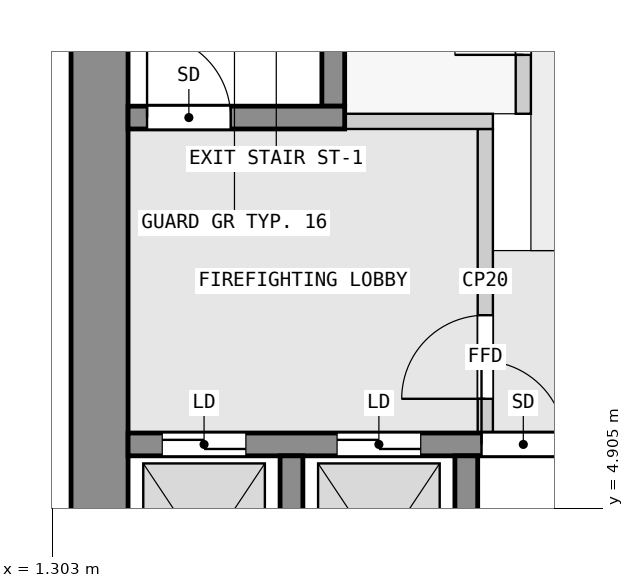
"""IFC4 building model, lengths in metres.
Left out: names, types, materials, properties, quantities, classifications, styles, units other than length and angle.
Written with IfcOpenShell. Run it as: python <this file> out.ifc"""

import sys

from ifc_helpers import new_model, si_unit, direction, frame, frame_2d, origin, place, context, subcontext, project, spatial, rectangle, extrude, element, fill, save


model = new_model("IFC4")
c1 = context("Model", 3, precision=1e-05, world=origin(), true_north=direction((0.0, 1.0)))
c2 = subcontext(c1, "Body", "Model", "MODEL_VIEW")
j1 = project(units=[si_unit("LENGTHUNIT", "METRE"), si_unit("PLANEANGLEUNIT", "RADIAN")], contexts=[c1])
p1 = place(None, origin())
s1 = spatial("IfcSite", under=j1, at=p1, CompositionType="ELEMENT")
p2 = place(p1, origin())
s2 = spatial("IfcBuilding", under=s1, at=p2, CompositionType="ELEMENT")
p3 = place(p2, frame((0.0, 0.0, 37.3)))
s3 = spatial("IfcBuildingStorey", under=s2, at=p3, CompositionType="ELEMENT", Elevation=37.3)
p4 = place(p3, frame((1.925, 2.5, 0.0), z_axis=(0.0, 0.0, 1.0), x_axis=(0.0, 1.0, 0.0)))
e1 = element("IfcWall", 1, at=p4, inside=s3, PredefinedType="SHEAR", context=c2, shape_type="SweptSolid", body=[
    extrude(rectangle(XDim=14.75, YDim=0.75, at=frame_2d((7.375, 0.0))), origin(), (0.0, 0.0, 1.0), 3.25),
])
for number, where, z_axis, x_axis in (
    (2, (4.45, 2.8, 0.0), (0.0, 0.0, 1.0), (0.0, 1.0, 0.0)),
    (3, (6.75, 2.8, 0.0), (0.0, 0.0, 1.0), (0.0, 1.0, 0.0)),
):
    element("IfcWall", number, at=place(p3, frame(where, z_axis=z_axis, x_axis=x_axis)), inside=s3, PredefinedType="SHEAR", context=c2, shape_type="SweptSolid", body=[
        extrude(rectangle(XDim=2.8, YDim=0.3, at=frame_2d((1.4, 0.0))), origin(), (0.0, 0.0, 1.0), 3.25),
    ])
p5 = place(p3, frame((2.3, 5.75, 0.0), z_axis=(0.0, 0.0, 1.0), x_axis=(1.0, 0.0, 0.0)))
e4 = element("IfcWall", 4, at=p5, inside=s3, PredefinedType="SHEAR", context=c2, shape_type="SweptSolid", body=[
    extrude(rectangle(XDim=18.8, YDim=0.3, at=frame_2d((9.4, 0.0))), origin(), (0.0, 0.0, 1.0), 3.25),
])
p6 = place(p5, frame((4.65, 0.0, 0.0)))
e5 = element("IfcOpeningElement", 5, at=p6, cuts=e4, PredefinedType="OPENING", context=c2, shape_type="SweptSolid", body=[
    extrude(rectangle(XDim=1.1, YDim=2.1, at=frame_2d((0.55, 1.05))), frame((0.0, 0.16, 0.0), z_axis=(0.0, -1.0, 0.0), x_axis=(1.0, 0.0, 0.0)), (0.0, 0.0, 1.0), 0.32),
])
p7 = place(p5, frame((0.45, 0.0, 0.0)))
e6 = element("IfcOpeningElement", 6, at=p7, cuts=e4, PredefinedType="OPENING", context=c2, shape_type="SweptSolid", body=[
    extrude(rectangle(XDim=1.1, YDim=2.1, at=frame_2d((0.55, 1.05))), frame((0.0, 0.16, 0.0), z_axis=(0.0, -1.0, 0.0), x_axis=(1.0, 0.0, 0.0)), (0.0, 0.0, 1.0), 0.32),
])
p8 = place(p5, frame((2.75, 0.0, 0.0)))
e7 = element("IfcOpeningElement", 7, at=p8, cuts=e4, PredefinedType="OPENING", context=c2, shape_type="SweptSolid", body=[
    extrude(rectangle(XDim=1.1, YDim=2.1, at=frame_2d((0.55, 1.05))), frame((0.0, 0.16, 0.0), z_axis=(0.0, -1.0, 0.0), x_axis=(1.0, 0.0, 0.0)), (0.0, 0.0, 1.0), 0.32),
])
p9 = place(p5, frame((11.85, 0.0, 0.0)))
e8 = element("IfcOpeningElement", 8, at=p9, cuts=e4, PredefinedType="OPENING", context=c2, shape_type="SweptSolid", body=[
    extrude(rectangle(XDim=1.1, YDim=2.1, at=frame_2d((0.55, 1.05))), frame((0.0, 0.16, 0.0), z_axis=(0.0, -1.0, 0.0), x_axis=(1.0, 0.0, 0.0)), (0.0, 0.0, 1.0), 0.32),
])
p10 = place(p5, frame((14.35, 0.0, 0.0)))
e9 = element("IfcOpeningElement", 9, at=p10, cuts=e4, PredefinedType="OPENING", context=c2, shape_type="SweptSolid", body=[
    extrude(rectangle(XDim=1.1, YDim=2.1, at=frame_2d((0.55, 1.05))), frame((0.0, 0.16, 0.0), z_axis=(0.0, -1.0, 0.0), x_axis=(1.0, 0.0, 0.0)), (0.0, 0.0, 1.0), 0.32),
])
p11 = place(p5, frame((16.85, 0.0, 0.0)))
e10 = element("IfcOpeningElement", 10, at=p11, cuts=e4, PredefinedType="OPENING", context=c2, shape_type="SweptSolid", body=[
    extrude(rectangle(XDim=1.1, YDim=2.1, at=frame_2d((0.55, 1.05))), frame((0.0, 0.16, 0.0), z_axis=(0.0, -1.0, 0.0), x_axis=(1.0, 0.0, 0.0)), (0.0, 0.0, 1.0), 0.32),
])
p12 = place(p3, frame((2.3, 10.05, 0.0), z_axis=(0.0, 0.0, 1.0), x_axis=(1.0, 0.0, 0.0)))
e11 = element("IfcWall", 11, at=p12, inside=s3, PredefinedType="SHEAR", context=c2, shape_type="SweptSolid", body=[
    extrude(rectangle(XDim=2.85, YDim=0.3, at=frame_2d((1.425, 0.0))), origin(), (0.0, 0.0, 1.0), 3.25),
])
p13 = place(p12, frame((0.25, 0.0, 0.0)))
e12 = element("IfcOpeningElement", 12, at=p13, cuts=e11, PredefinedType="OPENING", context=c2, shape_type="SweptSolid", body=[
    extrude(rectangle(XDim=1.1, YDim=2.1, at=frame_2d((0.55, 1.05))), frame((0.0, 0.16, 0.0), z_axis=(0.0, -1.0, 0.0), x_axis=(1.0, 0.0, 0.0)), (0.0, 0.0, 1.0), 0.32),
])
p14 = place(p3, frame((5.0, 10.2, 0.0), z_axis=(0.0, 0.0, 1.0), x_axis=(0.0, 1.0, 0.0)))
e13 = element("IfcWall", 13, at=p14, inside=s3, PredefinedType="SHEAR", context=c2, shape_type="SweptSolid", body=[
    extrude(rectangle(XDim=6.4, YDim=0.3, at=frame_2d((3.2, 0.0))), origin(), (0.0, 0.0, 1.0), 3.25),
])
p15 = place(p3, frame((7.0, 5.9, 0.0), z_axis=(0.0, 0.0, 1.0), x_axis=(0.0, 1.0, 0.0)))
e14 = element("IfcWall", 14, at=p15, inside=s3, PredefinedType="PARTITIONING", context=c2, shape_type="SweptSolid", body=[
    extrude(rectangle(XDim=4.0, YDim=0.2, at=frame_2d((2.0, 0.0))), origin(), (0.0, 0.0, 1.0), 3.25),
])
p16 = place(p15, frame((0.45, 0.0, 0.0)))
e15 = element("IfcOpeningElement", 15, at=p16, cuts=e14, PredefinedType="OPENING", context=c2, shape_type="SweptSolid", body=[
    extrude(rectangle(XDim=1.1, YDim=2.1, at=frame_2d((0.55, 1.05))), frame((0.0, 0.11, 0.0), z_axis=(0.0, -1.0, 0.0), x_axis=(1.0, 0.0, 0.0)), (0.0, 0.0, 1.0), 0.22),
])
p17 = place(p3, frame((5.15, 10.0, 0.0), z_axis=(0.0, 0.0, 1.0), x_axis=(1.0, 0.0, 0.0)))
e16 = element("IfcWall", 16, at=p17, inside=s3, PredefinedType="PARTITIONING", context=c2, shape_type="SweptSolid", body=[
    extrude(rectangle(XDim=1.95, YDim=0.2, at=frame_2d((0.975, 0.0))), origin(), (0.0, 0.0, 1.0), 3.25),
])
p18 = place(p3, frame((7.5, 10.1, 0.0), z_axis=(0.0, 0.0, 1.0), x_axis=(0.0, 1.0, 0.0)))
e17 = element("IfcWall", 17, at=p18, inside=s3, PredefinedType="PARTITIONING", context=c2, shape_type="SweptSolid", body=[
    extrude(rectangle(XDim=7.15, YDim=0.2, at=frame_2d((3.575, 0.0))), origin(), (0.0, 0.0, 1.0), 3.25),
])
p19 = place(p18, frame((0.775, 0.0, 0.0)))
e18 = element("IfcOpeningElement", 18, at=p19, cuts=e17, PredefinedType="OPENING", context=c2, shape_type="SweptSolid", body=[
    extrude(rectangle(XDim=0.9, YDim=2.1, at=frame_2d((0.45, 1.05))), frame((0.0, 0.11, 0.0), z_axis=(0.0, -1.0, 0.0), x_axis=(1.0, 0.0, 0.0)), (0.0, 0.0, 1.0), 0.22),
])
p20 = place(p18, frame((3.225, 0.0, 0.0)))
e19 = element("IfcOpeningElement", 19, at=p20, cuts=e17, PredefinedType="OPENING", context=c2, shape_type="SweptSolid", body=[
    extrude(rectangle(XDim=0.9, YDim=2.1, at=frame_2d((0.45, 1.05))), frame((0.0, 0.11, 0.0), z_axis=(0.0, -1.0, 0.0), x_axis=(1.0, 0.0, 0.0)), (0.0, 0.0, 1.0), 0.22),
])
p21 = place(p18, frame((5.25, 0.0, 0.0)))
e20 = element("IfcOpeningElement", 20, at=p21, cuts=e17, PredefinedType="OPENING", context=c2, shape_type="SweptSolid", body=[
    extrude(rectangle(XDim=0.9, YDim=2.1, at=frame_2d((0.45, 1.05))), frame((0.0, 0.11, 0.0), z_axis=(0.0, -1.0, 0.0), x_axis=(1.0, 0.0, 0.0)), (0.0, 0.0, 1.0), 0.22),
])
p22 = place(p16, origin())
e21 = element("IfcDoor", 21, at=p22, inside=s3, OperationType="SINGLE_SWING_LEFT", PredefinedType="DOOR", context=c2, shape_type="SweptSolid", body=[
    extrude(rectangle(XDim=1.1, YDim=2.1, at=frame_2d((0.55, 1.05))), frame((0.0, 0.025, 0.0), z_axis=(0.0, -1.0, 0.0), x_axis=(1.0, 0.0, 0.0)), (0.0, 0.0, 1.0), 0.05),
])
fill(e15, e21)
p23 = place(p13, origin())
e22 = element("IfcDoor", 22, at=p23, inside=s3, OperationType="SINGLE_SWING_RIGHT", PredefinedType="DOOR", context=c2, shape_type="SweptSolid", body=[
    extrude(rectangle(XDim=1.1, YDim=2.1, at=frame_2d((0.55, 1.05))), frame((0.0, 0.025, 0.0), z_axis=(0.0, -1.0, 0.0), x_axis=(1.0, 0.0, 0.0)), (0.0, 0.0, 1.0), 0.05),
])
fill(e12, e22)
p24 = place(p6, origin())
e23 = element("IfcDoor", 23, at=p24, inside=s3, OperationType="SINGLE_SWING_LEFT", PredefinedType="DOOR", context=c2, shape_type="SweptSolid", body=[
    extrude(rectangle(XDim=1.1, YDim=2.1, at=frame_2d((0.55, 1.05))), frame((0.0, 0.025, 0.0), z_axis=(0.0, -1.0, 0.0), x_axis=(1.0, 0.0, 0.0)), (0.0, 0.0, 1.0), 0.05),
])
fill(e5, e23)
p25 = place(p7, origin())
e24 = element("IfcDoor", 24, at=p25, inside=s3, OperationType="DOUBLE_DOOR_SLIDING", PredefinedType="DOOR", context=c2, shape_type="SweptSolid", body=[
    extrude(rectangle(XDim=1.1, YDim=2.1, at=frame_2d((0.55, 1.05))), frame((0.0, 0.025, 0.0), z_axis=(0.0, -1.0, 0.0), x_axis=(1.0, 0.0, 0.0)), (0.0, 0.0, 1.0), 0.05),
])
fill(e6, e24)
p26 = place(p8, origin())
e25 = element("IfcDoor", 25, at=p26, inside=s3, OperationType="DOUBLE_DOOR_SLIDING", PredefinedType="DOOR", context=c2, shape_type="SweptSolid", body=[
    extrude(rectangle(XDim=1.1, YDim=2.1, at=frame_2d((0.55, 1.05))), frame((0.0, 0.025, 0.0), z_axis=(0.0, -1.0, 0.0), x_axis=(1.0, 0.0, 0.0)), (0.0, 0.0, 1.0), 0.05),
])
fill(e7, e25)
p27 = place(p19, origin())
e26 = element("IfcDoor", 26, at=p27, inside=s3, OperationType="SINGLE_SWING_RIGHT", PredefinedType="DOOR", context=c2, shape_type="SweptSolid", body=[
    extrude(rectangle(XDim=0.9, YDim=2.1, at=frame_2d((0.45, 1.05))), frame((0.0, 0.025, 0.0), z_axis=(0.0, -1.0, 0.0), x_axis=(1.0, 0.0, 0.0)), (0.0, 0.0, 1.0), 0.05),
])
fill(e18, e26)
save(model, sys.argv[1])
